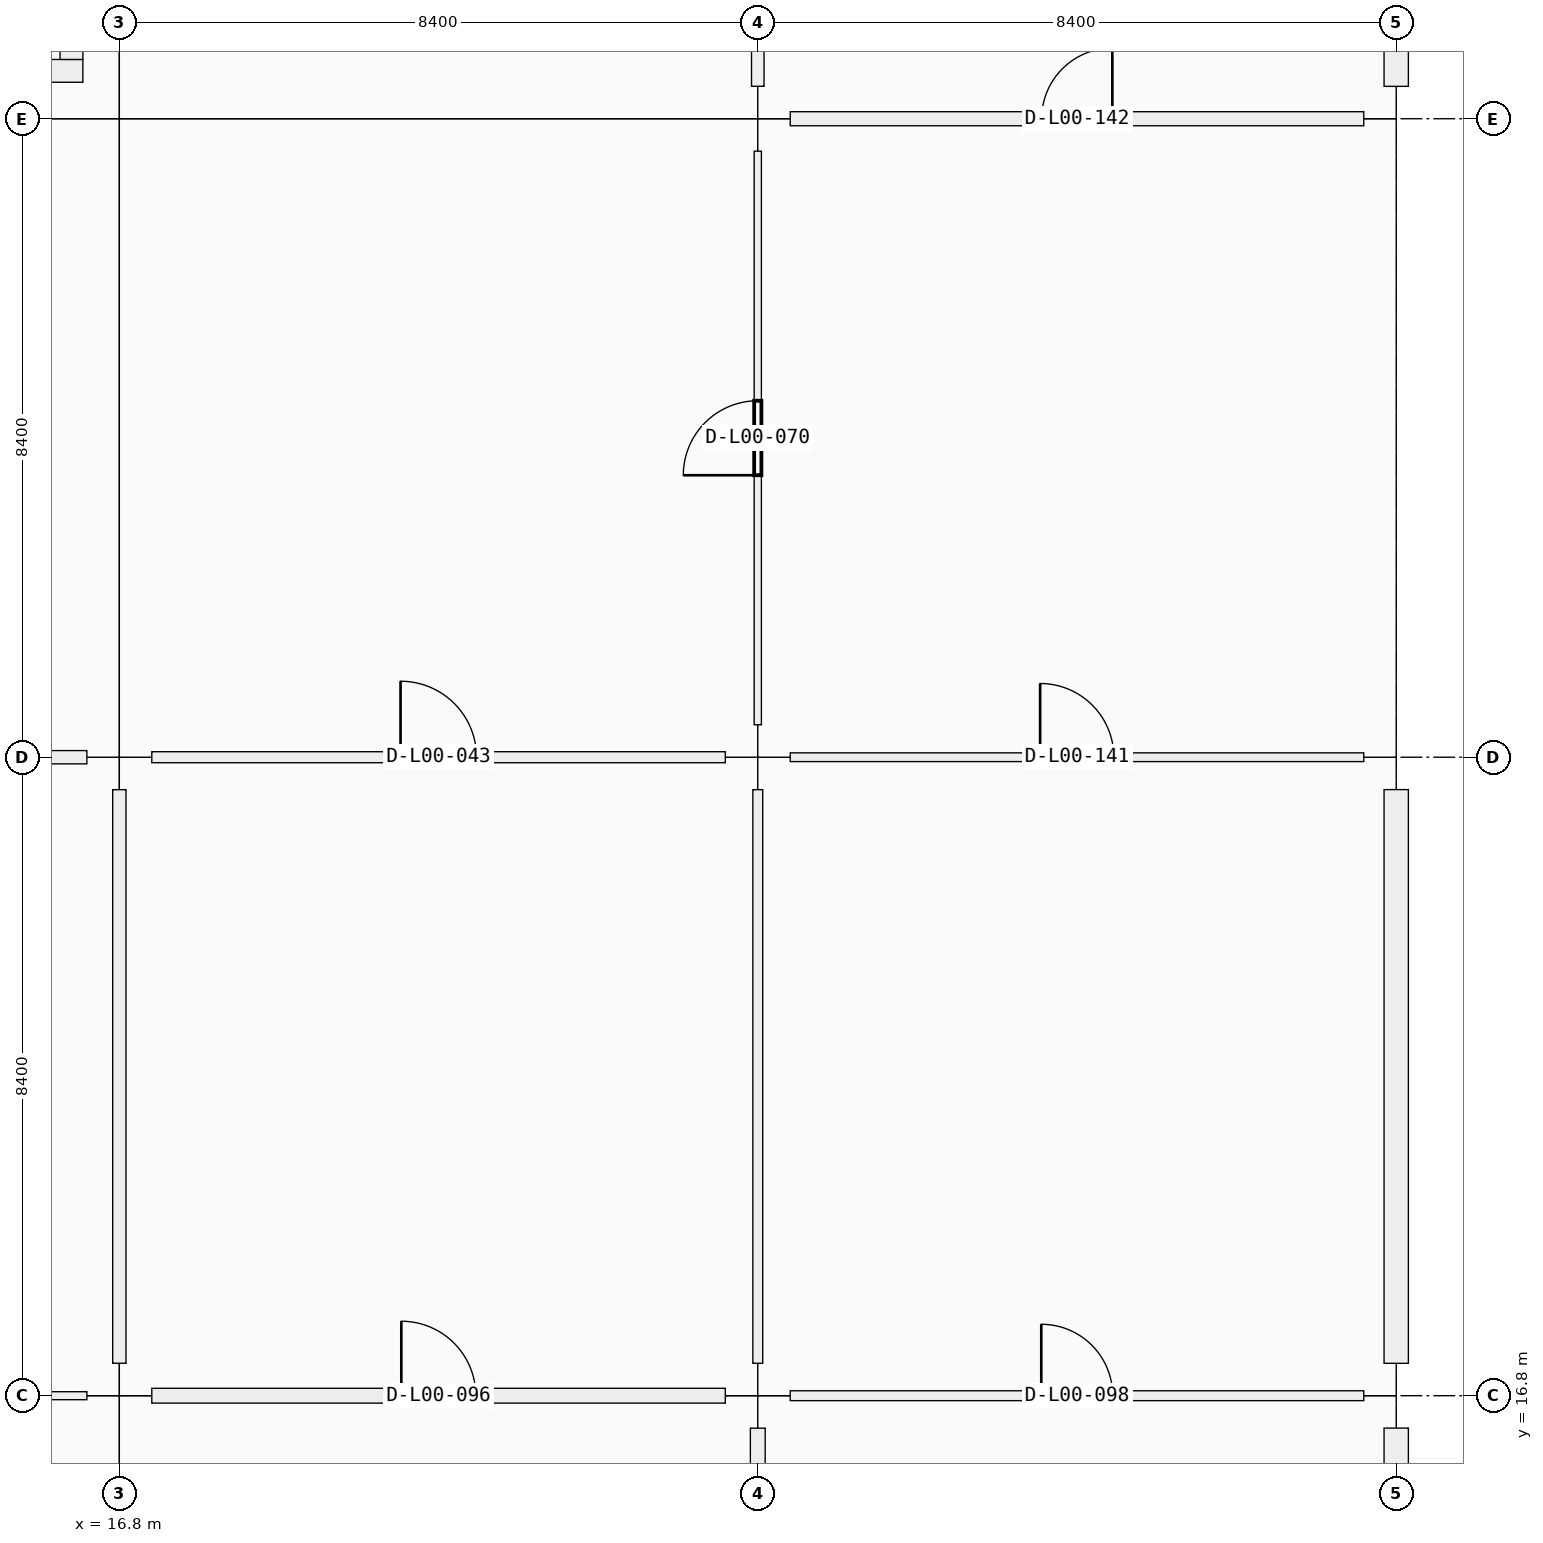
"""IFC4 building model, lengths in metres.
Left out: names, types, materials, properties, quantities, classifications, styles, units other than length and angle.
Written with IfcOpenShell. Run it as: python <this file> out.ifc"""

import sys

from ifc_helpers import new_model, si_unit, direction, frame, frame_2d, origin, origin_2d, place, context, subcontext, project, spatial, rectangle, extrude, element, fill, save


model = new_model("IFC4")
c1 = context("Model", 3, precision=1e-05, world=origin(), true_north=direction((0.0, 1.0)))
c2 = subcontext(c1, "Body", "Model", "MODEL_VIEW")
j1 = project(units=[si_unit("LENGTHUNIT", "METRE"), si_unit("PLANEANGLEUNIT", "RADIAN")], contexts=[c1])
p1 = place(None, origin())
s1 = spatial("IfcSite", under=j1, at=p1, CompositionType="ELEMENT")
p2 = place(p1, origin())
s2 = spatial("IfcBuilding", under=s1, at=p2, CompositionType="ELEMENT")
p3 = place(p2, origin())
s3 = spatial("IfcBuildingStorey", under=s2, at=p3, CompositionType="ELEMENT", Elevation=0.0)
for number, where, z_axis, x_axis in (
    (1, (16.8, 16.8, 0.0), (0.0, 0.0, 1.0), (1.0, 0.0, 0.0)),
    (2, (16.8, 25.2, 0.0), (0.0, 0.0, 1.0), (1.0, 0.0, 0.0)),
    (3, (16.8, 33.6, 0.0), (0.0, 0.0, 1.0), (1.0, 0.0, 0.0)),
    (4, (25.2, 16.8, 0.0), (0.0, 0.0, 1.0), (1.0, 0.0, 0.0)),
    (5, (25.2, 25.2, 0.0), (0.0, 0.0, 1.0), (1.0, 0.0, 0.0)),
    (6, (25.2, 33.6, 0.0), (0.0, 0.0, 1.0), (1.0, 0.0, 0.0)),
    (7, (33.6, 16.8, 0.0), (0.0, 0.0, 1.0), (1.0, 0.0, 0.0)),
    (8, (33.6, 25.2, 0.0), (0.0, 0.0, 1.0), (1.0, 0.0, 0.0)),
    (9, (33.6, 33.6, 0.0), (0.0, 0.0, 1.0), (1.0, 0.0, 0.0)),
):
    element("IfcColumn", number, at=place(p3, frame(where, z_axis=z_axis, x_axis=x_axis)), inside=s3, PredefinedType="COLUMN", context=c2, shape_type="SweptSolid", body=[
        extrude(rectangle(XDim=0.85, YDim=0.85, at=origin_2d()), origin(), (0.0, 0.0, 1.0), 5.76),
    ])
p4 = place(p3, frame((33.6, 16.374, 0.0), z_axis=(0.0, 0.0, 1.0), x_axis=(0.0, -1.0, 0.0)))
e10 = element("IfcWall", 10, at=p4, inside=s3, PredefinedType="SOLIDWALL", context=c2, shape_type="SweptSolid", body=[
    extrude(rectangle(XDim=7.623, YDim=0.32, at=frame_2d((3.812, 0.0))), origin(), (0.0, 0.0, 1.0), 4.7),
])
p5 = place(p4, frame((2.462, 0.0, 0.9)))
e11 = element("IfcOpeningElement", 11, at=p5, cuts=e10, PredefinedType="OPENING", context=c2, shape_type="SweptSolid", body=[
    extrude(rectangle(XDim=2.7, YDim=1.2, at=frame_2d((1.35, 0.6))), frame((0.0, 0.16, 0.0), z_axis=(0.0, -1.0, 0.0), x_axis=(1.0, 0.0, 0.0)), (0.0, 0.0, 1.0), 0.32),
])
p6 = place(p3, frame((33.6, 24.774, 0.0), z_axis=(0.0, 0.0, 1.0), x_axis=(0.0, -1.0, 0.0)))
e12 = element("IfcWall", 12, at=p6, inside=s3, PredefinedType="SOLIDWALL", context=c2, shape_type="SweptSolid", body=[
    extrude(rectangle(XDim=7.548, YDim=0.32, at=frame_2d((3.774, 0.0))), origin(), (0.0, 0.0, 1.0), 4.7),
])
p7 = place(p6, frame((2.674, 0.0, 0.9)))
e13 = element("IfcOpeningElement", 13, at=p7, cuts=e12, PredefinedType="OPENING", context=c2, shape_type="SweptSolid", body=[
    extrude(rectangle(XDim=2.2, YDim=1.35, at=frame_2d((1.1, 0.675))), frame((0.0, 0.16, 0.0), z_axis=(0.0, -1.0, 0.0), x_axis=(1.0, 0.0, 0.0)), (0.0, 0.0, 1.0), 0.32),
])
p8 = place(p3, frame((33.6, 41.574, 0.0), z_axis=(0.0, 0.0, 1.0), x_axis=(0.0, -1.0, 0.0)))
e14 = element("IfcWall", 14, at=p8, inside=s3, PredefinedType="SOLIDWALL", context=c2, shape_type="SweptSolid", body=[
    extrude(rectangle(XDim=7.548, YDim=0.32, at=frame_2d((3.774, 0.0))), origin(), (0.0, 0.0, 1.0), 4.7),
])
p9 = place(p8, frame((2.874, 0.0, 0.9)))
e15 = element("IfcOpeningElement", 15, at=p9, cuts=e14, PredefinedType="OPENING", context=c2, shape_type="SweptSolid", body=[
    extrude(rectangle(XDim=1.8, YDim=1.35, at=frame_2d((0.9, 0.675))), frame((0.0, 0.16, 0.0), z_axis=(0.0, -1.0, 0.0), x_axis=(1.0, 0.0, 0.0)), (0.0, 0.0, 1.0), 0.32),
])
p10 = place(p3, frame((16.32, 34.23, 0.0), z_axis=(0.0, 0.0, 1.0), x_axis=(-1.0, 0.0, 0.0)))
e16 = element("IfcWall", 16, at=p10, inside=s3, PredefinedType="SHEAR", context=c2, shape_type="SweptSolid", body=[
    extrude(rectangle(XDim=7.44, YDim=0.3, at=frame_2d((3.72, 0.0))), origin(), (0.0, 0.0, 1.0), 5.76),
])
p11 = place(p10, frame((1.28, 0.0, 0.0)))
e17 = element("IfcOpeningElement", 17, at=p11, cuts=e16, PredefinedType="OPENING", context=c2, shape_type="SweptSolid", body=[
    extrude(rectangle(XDim=1.5, YDim=2.15, at=frame_2d((0.75, 1.075))), frame((0.0, 0.15, 0.0), z_axis=(0.0, -1.0, 0.0), x_axis=(1.0, 0.0, 0.0)), (0.0, 0.0, 1.0), 0.3),
])
p12 = place(p3, frame((16.17, 41.22, 0.0), z_axis=(0.0, 0.0, 1.0), x_axis=(0.0, -1.0, 0.0)))
e18 = element("IfcWall", 18, at=p12, inside=s3, PredefinedType="SHEAR", context=c2, shape_type="SweptSolid", body=[
    extrude(rectangle(XDim=6.84, YDim=0.3, at=frame_2d((3.42, 0.0))), origin(), (0.0, 0.0, 1.0), 5.76),
])
p13 = place(p3, frame((8.827, 16.8, 0.0), z_axis=(0.0, 0.0, 1.0), x_axis=(1.0, 0.0, 0.0)))
e19 = element("IfcWall", 19, at=p13, inside=s3, PredefinedType="PARTITIONING", context=c2, shape_type="SweptSolid", body=[
    extrude(rectangle(XDim=7.546, YDim=0.105, at=frame_2d((3.773, 0.0))), origin(), (0.0, 0.0, 1.0), 3.66),
])
p14 = place(p13, frame((3.273, 0.0, 0.0)))
e20 = element("IfcOpeningElement", 20, at=p14, cuts=e19, PredefinedType="OPENING", context=c2, shape_type="SweptSolid", body=[
    extrude(rectangle(XDim=1.0, YDim=2.2, at=frame_2d((0.5, 1.1))), frame((0.0, 0.052, 0.0), z_axis=(0.0, -1.0, 0.0), x_axis=(1.0, 0.0, 0.0)), (0.0, 0.0, 1.0), 0.105),
])
p15 = place(p3, frame((8.827, 25.2, 0.0), z_axis=(0.0, 0.0, 1.0), x_axis=(1.0, 0.0, 0.0)))
e21 = element("IfcWall", 21, at=p15, inside=s3, PredefinedType="PARTITIONING", context=c2, shape_type="SweptSolid", body=[
    extrude(rectangle(XDim=7.546, YDim=0.175, at=frame_2d((3.773, 0.0))), origin(), (0.0, 0.0, 1.0), 3.66),
])
p16 = place(p15, frame((3.253, 0.0, 0.0)))
e22 = element("IfcOpeningElement", 22, at=p16, cuts=e21, PredefinedType="OPENING", context=c2, shape_type="SweptSolid", body=[
    extrude(rectangle(XDim=1.04, YDim=2.2, at=frame_2d((0.52, 1.1))), frame((0.0, 0.087, 0.0), z_axis=(0.0, -1.0, 0.0), x_axis=(1.0, 0.0, 0.0)), (0.0, 0.0, 1.0), 0.175),
])
p17 = place(p3, frame((17.227, 16.8, 0.0), z_axis=(0.0, 0.0, 1.0), x_axis=(1.0, 0.0, 0.0)))
e23 = element("IfcWall", 23, at=p17, inside=s3, PredefinedType="PARTITIONING", context=c2, shape_type="SweptSolid", body=[
    extrude(rectangle(XDim=7.546, YDim=0.195, at=frame_2d((3.773, 0.0))), origin(), (0.0, 0.0, 1.0), 3.66),
])
p18 = place(p17, frame((3.283, 0.0, 0.0)))
e24 = element("IfcOpeningElement", 24, at=p18, cuts=e23, PredefinedType="OPENING", context=c2, shape_type="SweptSolid", body=[
    extrude(rectangle(XDim=0.98, YDim=2.18, at=frame_2d((0.49, 1.09))), frame((0.0, 0.098, 0.0), z_axis=(0.0, -1.0, 0.0), x_axis=(1.0, 0.0, 0.0)), (0.0, 0.0, 1.0), 0.195),
])
p19 = place(p3, frame((17.227, 25.2, 0.0), z_axis=(0.0, 0.0, 1.0), x_axis=(1.0, 0.0, 0.0)))
e25 = element("IfcWall", 25, at=p19, inside=s3, PredefinedType="PARTITIONING", context=c2, shape_type="SweptSolid", body=[
    extrude(rectangle(XDim=7.546, YDim=0.145, at=frame_2d((3.773, 0.0))), origin(), (0.0, 0.0, 1.0), 3.66),
])
p20 = place(p19, frame((3.273, 0.0, 0.0)))
e26 = element("IfcOpeningElement", 26, at=p20, cuts=e25, PredefinedType="OPENING", context=c2, shape_type="SweptSolid", body=[
    extrude(rectangle(XDim=1.0, YDim=2.2, at=frame_2d((0.5, 1.1))), frame((0.0, 0.073, 0.0), z_axis=(0.0, -1.0, 0.0), x_axis=(1.0, 0.0, 0.0)), (0.0, 0.0, 1.0), 0.145),
])
p21 = place(p3, frame((25.627, 16.8, 0.0), z_axis=(0.0, 0.0, 1.0), x_axis=(1.0, 0.0, 0.0)))
e27 = element("IfcWall", 27, at=p21, inside=s3, PredefinedType="MOVABLE", context=c2, shape_type="SweptSolid", body=[
    extrude(rectangle(XDim=7.546, YDim=0.13, at=frame_2d((3.773, 0.0))), origin(), (0.0, 0.0, 1.0), 3.66),
])
p22 = place(p21, frame((3.303, 0.0, 0.0)))
e28 = element("IfcOpeningElement", 28, at=p22, cuts=e27, PredefinedType="OPENING", context=c2, shape_type="SweptSolid", body=[
    extrude(rectangle(XDim=0.94, YDim=2.15, at=frame_2d((0.47, 1.075))), frame((0.0, 0.065, 0.0), z_axis=(0.0, -1.0, 0.0), x_axis=(1.0, 0.0, 0.0)), (0.0, 0.0, 1.0), 0.13),
])
p23 = place(p3, frame((25.627, 25.2, 0.0), z_axis=(0.0, 0.0, 1.0), x_axis=(1.0, 0.0, 0.0)))
e29 = element("IfcWall", 29, at=p23, inside=s3, PredefinedType="PARTITIONING", context=c2, shape_type="SweptSolid", body=[
    extrude(rectangle(XDim=7.546, YDim=0.115, at=frame_2d((3.773, 0.0))), origin(), (0.0, 0.0, 1.0), 3.66),
])
p24 = place(p23, frame((3.288, 0.0, 0.0)))
e30 = element("IfcOpeningElement", 30, at=p24, cuts=e29, PredefinedType="OPENING", context=c2, shape_type="SweptSolid", body=[
    extrude(rectangle(XDim=0.97, YDim=2.12, at=frame_2d((0.485, 1.06))), frame((0.0, 0.058, 0.0), z_axis=(0.0, -1.0, 0.0), x_axis=(1.0, 0.0, 0.0)), (0.0, 0.0, 1.0), 0.115),
])
p25 = place(p3, frame((25.627, 33.6, 0.0), z_axis=(0.0, 0.0, 1.0), x_axis=(1.0, 0.0, 0.0)))
e31 = element("IfcWall", 31, at=p25, inside=s3, PredefinedType="PARTITIONING", context=c2, shape_type="SweptSolid", body=[
    extrude(rectangle(XDim=7.546, YDim=0.185, at=frame_2d((3.773, 0.0))), origin(), (0.0, 0.0, 1.0), 3.66),
])
p26 = place(p25, frame((3.308, 0.0, 0.0)))
e32 = element("IfcOpeningElement", 32, at=p26, cuts=e31, PredefinedType="OPENING", context=c2, shape_type="SweptSolid", body=[
    extrude(rectangle(XDim=0.93, YDim=2.12, at=frame_2d((0.465, 1.06))), frame((0.0, 0.093, 0.0), z_axis=(0.0, -1.0, 0.0), x_axis=(1.0, 0.0, 0.0)), (0.0, 0.0, 1.0), 0.185),
])
p27 = place(p3, frame((16.8, 17.227, 0.0), z_axis=(0.0, 0.0, 1.0), x_axis=(0.0, 1.0, 0.0)))
e33 = element("IfcWall", 33, at=p27, inside=s3, PredefinedType="PARTITIONING", context=c2, shape_type="SweptSolid", body=[
    extrude(rectangle(XDim=7.546, YDim=0.175, at=frame_2d((3.773, 0.0))), origin(), (0.0, 0.0, 1.0), 3.66),
])
p28 = place(p27, frame((3.313, 0.0, 0.0)))
e34 = element("IfcOpeningElement", 34, at=p28, cuts=e33, PredefinedType="OPENING", context=c2, shape_type="SweptSolid", body=[
    extrude(rectangle(XDim=0.92, YDim=2.15, at=frame_2d((0.46, 1.075))), frame((0.0, 0.087, 0.0), z_axis=(0.0, -1.0, 0.0), x_axis=(1.0, 0.0, 0.0)), (0.0, 0.0, 1.0), 0.175),
])
p29 = place(p3, frame((25.2, 8.777, 0.0), z_axis=(0.0, 0.0, 1.0), x_axis=(0.0, 1.0, 0.0)))
e35 = element("IfcWall", 35, at=p29, inside=s3, PredefinedType="PARTITIONING", context=c2, shape_type="SweptSolid", body=[
    extrude(rectangle(XDim=7.596, YDim=0.195, at=frame_2d((3.798, 0.0))), origin(), (0.0, 0.0, 1.0), 3.66),
])
p30 = place(p29, frame((3.328, 0.0, 0.0)))
e36 = element("IfcOpeningElement", 36, at=p30, cuts=e35, PredefinedType="OPENING", context=c2, shape_type="SweptSolid", body=[
    extrude(rectangle(XDim=0.94, YDim=2.15, at=frame_2d((0.47, 1.075))), frame((0.0, 0.098, 0.0), z_axis=(0.0, -1.0, 0.0), x_axis=(1.0, 0.0, 0.0)), (0.0, 0.0, 1.0), 0.195),
])
p31 = place(p3, frame((25.2, 17.227, 0.0), z_axis=(0.0, 0.0, 1.0), x_axis=(0.0, 1.0, 0.0)))
e37 = element("IfcWall", 37, at=p31, inside=s3, PredefinedType="MOVABLE", context=c2, shape_type="SweptSolid", body=[
    extrude(rectangle(XDim=7.546, YDim=0.13, at=frame_2d((3.773, 0.0))), origin(), (0.0, 0.0, 1.0), 3.66),
])
p32 = place(p31, frame((3.268, 0.0, 0.0)))
e38 = element("IfcOpeningElement", 38, at=p32, cuts=e37, PredefinedType="OPENING", context=c2, shape_type="SweptSolid", body=[
    extrude(rectangle(XDim=1.01, YDim=2.12, at=frame_2d((0.505, 1.06))), frame((0.0, 0.065, 0.0), z_axis=(0.0, -1.0, 0.0), x_axis=(1.0, 0.0, 0.0)), (0.0, 0.0, 1.0), 0.13),
])
p33 = place(p3, frame((25.2, 25.627, 0.0), z_axis=(0.0, 0.0, 1.0), x_axis=(0.0, 1.0, 0.0)))
e39 = element("IfcWall", 39, at=p33, inside=s3, PredefinedType="PARTITIONING", context=c2, shape_type="SweptSolid", body=[
    extrude(rectangle(XDim=7.546, YDim=0.095, at=frame_2d((3.773, 0.0))), origin(), (0.0, 0.0, 1.0), 3.66),
])
p34 = place(p33, frame((3.283, 0.0, 0.0)))
e40 = element("IfcOpeningElement", 40, at=p34, cuts=e39, PredefinedType="OPENING", context=c2, shape_type="SweptSolid", body=[
    extrude(rectangle(XDim=0.98, YDim=2.18, at=frame_2d((0.49, 1.09))), frame((0.0, 0.047, 0.0), z_axis=(0.0, -1.0, 0.0), x_axis=(1.0, 0.0, 0.0)), (0.0, 0.0, 1.0), 0.095),
])
p35 = place(p3, frame((25.2, 34.027, 0.0), z_axis=(0.0, 0.0, 1.0), x_axis=(0.0, 1.0, 0.0)))
e41 = element("IfcWall", 41, at=p35, inside=s3, PredefinedType="PARTITIONING", context=c2, shape_type="SweptSolid", body=[
    extrude(rectangle(XDim=7.546, YDim=0.165, at=frame_2d((3.773, 0.0))), origin(), (0.0, 0.0, 1.0), 3.66),
])
p36 = place(p35, frame((3.293, 0.0, 0.0)))
e42 = element("IfcOpeningElement", 42, at=p36, cuts=e41, PredefinedType="OPENING", context=c2, shape_type="SweptSolid", body=[
    extrude(rectangle(XDim=0.96, YDim=2.18, at=frame_2d((0.48, 1.09))), frame((0.0, 0.083, 0.0), z_axis=(0.0, -1.0, 0.0), x_axis=(1.0, 0.0, 0.0)), (0.0, 0.0, 1.0), 0.165),
])
p37 = place(p7, origin())
e43 = element("IfcWindow", 43, at=p37, inside=s3, PartitioningType="SINGLE_PANEL", PredefinedType="WINDOW", context=c2, shape_type="SweptSolid", body=[
    extrude(rectangle(XDim=2.2, YDim=1.35, at=frame_2d((1.1, 0.675))), frame((0.0, 0.03, 0.0), z_axis=(0.0, -1.0, 0.0), x_axis=(1.0, 0.0, 0.0)), (0.0, 0.0, 1.0), 0.06),
])
fill(e13, e43)
p38 = place(p20, origin())
e44 = element("IfcDoor", 44, at=p38, inside=s3, OperationType="SINGLE_SWING_LEFT", PredefinedType="DOOR", context=c2, shape_type="SweptSolid", body=[
    extrude(rectangle(XDim=1.0, YDim=2.2, at=frame_2d((0.5, 1.1))), frame((0.0, 0.025, 0.0), z_axis=(0.0, -1.0, 0.0), x_axis=(1.0, 0.0, 0.0)), (0.0, 0.0, 1.0), 0.05),
])
fill(e26, e44)
p39 = place(p34, origin())
e45 = element("IfcDoor", 45, at=p39, inside=s3, OperationType="SINGLE_SWING_LEFT", PredefinedType="DOOR", context=c2, shape_type="SweptSolid", body=[
    extrude(rectangle(XDim=0.98, YDim=2.18, at=frame_2d((0.49, 1.09))), frame((0.0, 0.025, 0.0), z_axis=(0.0, -1.0, 0.0), x_axis=(1.0, 0.0, 0.0)), (0.0, 0.0, 1.0), 0.05),
])
fill(e40, e45)
p40 = place(p18, origin())
e46 = element("IfcDoor", 46, at=p40, inside=s3, OperationType="SINGLE_SWING_LEFT", PredefinedType="DOOR", context=c2, shape_type="SweptSolid", body=[
    extrude(rectangle(XDim=0.98, YDim=2.18, at=frame_2d((0.49, 1.09))), frame((0.0, 0.025, 0.0), z_axis=(0.0, -1.0, 0.0), x_axis=(1.0, 0.0, 0.0)), (0.0, 0.0, 1.0), 0.05),
])
fill(e24, e46)
p41 = place(p22, origin())
e47 = element("IfcDoor", 47, at=p41, inside=s3, OperationType="SINGLE_SWING_LEFT", PredefinedType="DOOR", context=c2, shape_type="SweptSolid", body=[
    extrude(rectangle(XDim=0.94, YDim=2.15, at=frame_2d((0.47, 1.075))), frame((0.0, 0.025, 0.0), z_axis=(0.0, -1.0, 0.0), x_axis=(1.0, 0.0, 0.0)), (0.0, 0.0, 1.0), 0.05),
])
fill(e28, e47)
p42 = place(p24, origin())
e48 = element("IfcDoor", 48, at=p42, inside=s3, OperationType="SINGLE_SWING_LEFT", PredefinedType="DOOR", context=c2, shape_type="SweptSolid", body=[
    extrude(rectangle(XDim=0.97, YDim=2.12, at=frame_2d((0.485, 1.06))), frame((0.0, 0.025, 0.0), z_axis=(0.0, -1.0, 0.0), x_axis=(1.0, 0.0, 0.0)), (0.0, 0.0, 1.0), 0.05),
])
fill(e30, e48)
p43 = place(p26, origin())
e49 = element("IfcDoor", 49, at=p43, inside=s3, OperationType="SINGLE_SWING_RIGHT", PredefinedType="DOOR", context=c2, shape_type="SweptSolid", body=[
    extrude(rectangle(XDim=0.93, YDim=2.12, at=frame_2d((0.465, 1.06))), frame((0.0, 0.025, 0.0), z_axis=(0.0, -1.0, 0.0), x_axis=(1.0, 0.0, 0.0)), (0.0, 0.0, 1.0), 0.05),
])
fill(e32, e49)
p44 = place(p28, origin())
e50 = element("IfcDoor", 50, at=p44, inside=s3, OperationType="SINGLE_SWING_LEFT", PredefinedType="DOOR", context=c2, shape_type="SweptSolid", body=[
    extrude(rectangle(XDim=0.92, YDim=2.15, at=frame_2d((0.46, 1.075))), frame((0.0, 0.025, 0.0), z_axis=(0.0, -1.0, 0.0), x_axis=(1.0, 0.0, 0.0)), (0.0, 0.0, 1.0), 0.05),
])
fill(e34, e50)
p45 = place(p32, origin())
e51 = element("IfcDoor", 51, at=p45, inside=s3, OperationType="SINGLE_SWING_LEFT", PredefinedType="DOOR", context=c2, shape_type="SweptSolid", body=[
    extrude(rectangle(XDim=1.01, YDim=2.12, at=frame_2d((0.505, 1.06))), frame((0.0, 0.025, 0.0), z_axis=(0.0, -1.0, 0.0), x_axis=(1.0, 0.0, 0.0)), (0.0, 0.0, 1.0), 0.05),
])
fill(e38, e51)
save(model, sys.argv[1])
